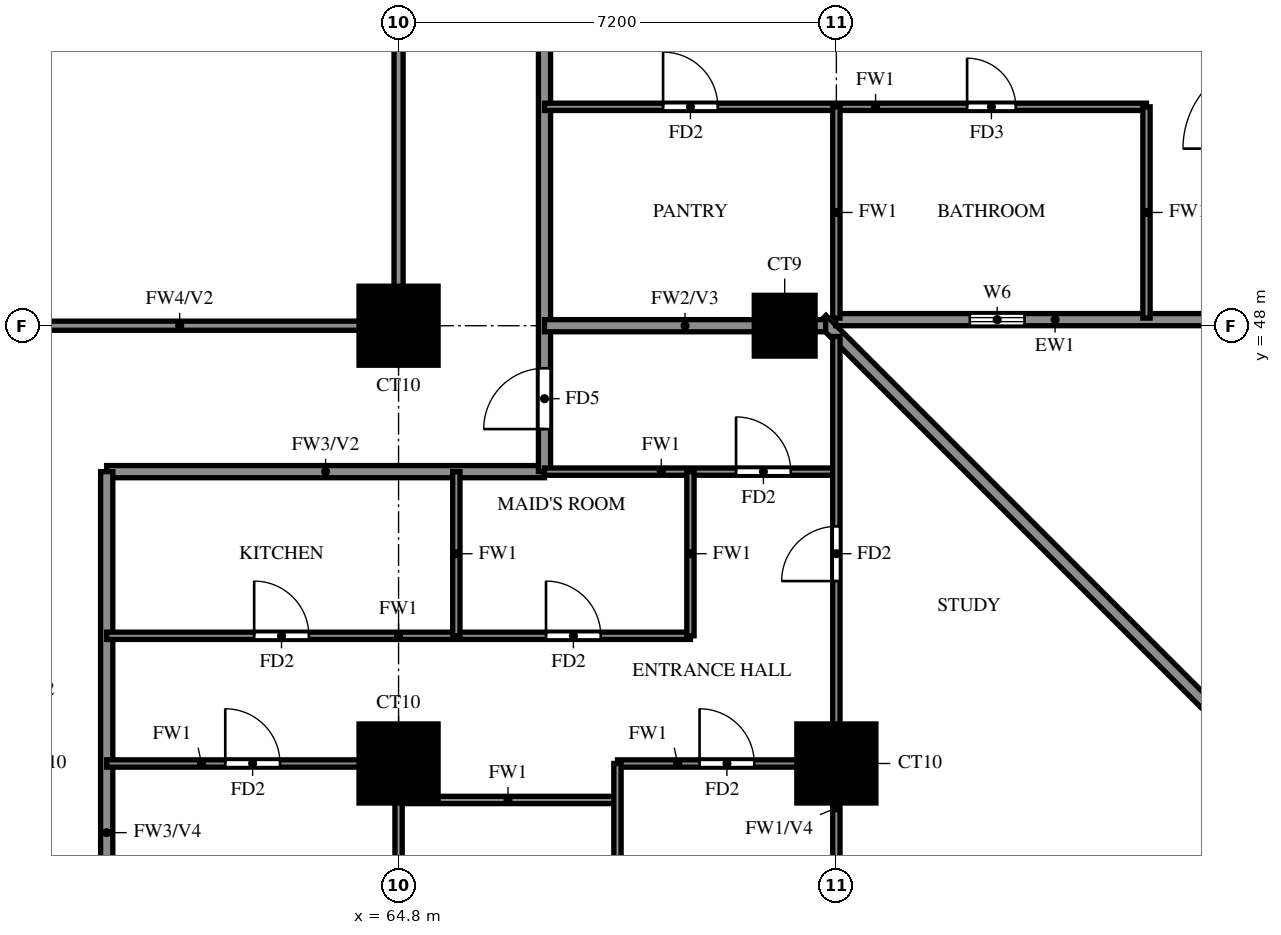
"""IFC4 building model, lengths in metres.
Left out: names, types, materials, properties, quantities, classifications, styles, units other than length and angle.
Written with IfcOpenShell. Run it as: python <this file> out.ifc"""

import sys

from ifc_helpers import new_model, si_unit, direction, frame, frame_2d, origin, origin_2d, place, context, subcontext, project, spatial, rectangle, extrude, source, transform, mapped, element, fill, save


model = new_model("IFC4")
c1 = context("Model", 3, precision=1e-05, world=origin(), true_north=direction((0.0, 1.0)))
c2 = subcontext(c1, "Body", "Model", "MODEL_VIEW")
j1 = project(units=[si_unit("LENGTHUNIT", "METRE"), si_unit("PLANEANGLEUNIT", "RADIAN")], contexts=[c1])
p1 = place(None, origin())
s1 = spatial("IfcSite", under=j1, at=p1, CompositionType="ELEMENT")
p2 = place(p1, origin())
s2 = spatial("IfcBuilding", under=s1, at=p2, CompositionType="ELEMENT")
p3 = place(p2, frame((0.0, 0.0, 79.5)))
s3 = spatial("IfcBuildingStorey", under=s2, at=p3, CompositionType="ELEMENT", Elevation=79.5)
m1 = source(origin(), c2, "Body", "SweptSolid", [
    extrude(rectangle(XDim=1.3, YDim=1.3, at=origin_2d()), origin(), (0.0, 0.0, 1.0), 3.18),
])
for number, where, z_axis, x_axis in (
    (1, (64.8, 40.8, 0.0), (0.0, 0.0, 1.0), (1.0, 0.0, 0.0)),
    (2, (72.0, 40.8, 0.0), (0.0, 0.0, 1.0), (1.0, 0.0, 0.0)),
    (3, (64.8, 48.0, 0.0), (0.0, 0.0, 1.0), (1.0, 0.0, 0.0)),
):
    element("IfcColumn", number, at=place(p3, frame(where, z_axis=z_axis, x_axis=x_axis)), inside=s3, PredefinedType="COLUMN", context=c2, shape_type="MappedRepresentation", body=[
        mapped(m1, transform((0.0, 0.0, 0.0))),
    ])
m2 = source(origin(), c2, "Body", "SweptSolid", [
    extrude(rectangle(XDim=1.0, YDim=1.0, at=origin_2d()), origin(), (0.0, 0.0, 1.0), 3.18),
])
p4 = place(p3, frame((71.15, 48.0, 0.0), z_axis=(0.0, 0.0, 1.0), x_axis=(1.0, 0.0, 0.0)))
e4 = element("IfcColumn", 4, at=p4, inside=s3, PredefinedType="COLUMN", context=c2, shape_type="MappedRepresentation", body=[
    mapped(m2, transform((0.0, 0.0, 0.0))),
])
p5 = place(p3, frame((85.996, 33.863, 0.0), z_axis=(0.0, 0.0, 1.0), x_axis=(-0.707100718496, 0.707112843825, 0.0)))
e5 = element("IfcWall", 5, at=p5, inside=s3, PredefinedType="SOLIDWALL", context=c2, shape_type="SweptSolid", body=[
    extrude(rectangle(XDim=20.135, YDim=0.2, at=frame_2d((10.067, 0.0))), origin(), (0.0, 0.0, 1.0), 3.18),
])
p6 = place(p3, frame((71.989, 48.1, 0.0), z_axis=(0.0, 0.0, 1.0), x_axis=(1.0, 0.0, 0.0)))
e6 = element("IfcWall", 6, at=p6, inside=s3, PredefinedType="SOLIDWALL", context=c2, shape_type="SweptSolid", body=[
    extrude(rectangle(XDim=6.562, YDim=0.2, at=frame_2d((3.281, 0.0))), origin(), (0.0, 0.0, 1.0), 3.18),
])
p7 = place(p6, frame((2.206, 0.0, 1.5)))
e7 = element("IfcOpeningElement", 7, at=p7, cuts=e6, PredefinedType="OPENING", context=c2, shape_type="SweptSolid", body=[
    extrude(rectangle(XDim=0.9, YDim=0.9, at=frame_2d((0.45, 0.45))), frame((0.0, 0.11, 0.0), z_axis=(0.0, -1.0, 0.0), x_axis=(1.0, 0.0, 0.0)), (0.0, 0.0, 1.0), 0.22),
])
p8 = place(p3, frame((60.0, 45.6, 0.0), z_axis=(0.0, 0.0, 1.0), x_axis=(1.0, 0.0, 0.0)))
e8 = element("IfcWall", 8, at=p8, inside=s3, PredefinedType="SOLIDWALL", context=c2, shape_type="SweptSolid", body=[
    extrude(rectangle(XDim=7.2, YDim=0.2, at=frame_2d((3.6, 0.0))), origin(), (0.0, 0.0, 1.0), 3.18),
])
p9 = place(p3, frame((60.0, 33.725, 0.0), z_axis=(0.0, 0.0, 1.0), x_axis=(0.0, 1.0, 0.0)))
e9 = element("IfcWall", 9, at=p9, inside=s3, PredefinedType="SOLIDWALL", context=c2, shape_type="SweptSolid", body=[
    extrude(rectangle(XDim=11.875, YDim=0.2, at=frame_2d((5.938, 0.0))), origin(), (0.0, 0.0, 1.0), 2.28),
])
p10 = place(p3, frame((67.2, 45.6, 0.0), z_axis=(0.0, 0.0, 1.0), x_axis=(0.0, 1.0, 0.0)))
e10 = element("IfcWall", 10, at=p10, inside=s3, PredefinedType="SOLIDWALL", context=c2, shape_type="SweptSolid", body=[
    extrude(rectangle(XDim=14.4, YDim=0.2, at=frame_2d((7.2, 0.0))), origin(), (0.0, 0.0, 1.0), 3.18),
])
p11 = place(p10, frame((0.7, 0.0, 0.0)))
e11 = element("IfcOpeningElement", 11, at=p11, cuts=e10, PredefinedType="OPENING", context=c2, shape_type="SweptSolid", body=[
    extrude(rectangle(XDim=1.0, YDim=2.1, at=frame_2d((0.5, 1.05))), frame((0.0, 0.11, 0.0), z_axis=(0.0, -1.0, 0.0), x_axis=(1.0, 0.0, 0.0)), (0.0, 0.0, 1.0), 0.22),
])
p12 = place(p3, frame((67.2, 48.0, 0.0), z_axis=(0.0, 0.0, 1.0), x_axis=(1.0, 0.0, 0.0)))
e12 = element("IfcWall", 12, at=p12, inside=s3, PredefinedType="SOLIDWALL", context=c2, shape_type="SweptSolid", body=[
    extrude(rectangle(XDim=4.623, YDim=0.2, at=frame_2d((2.312, 0.0))), origin(), (0.0, 0.0, 1.0), 3.18),
])
p13 = place(p3, frame((64.8, 40.2, 0.0), z_axis=(0.0, 0.0, 1.0), x_axis=(1.0, 0.0, 0.0)))
e13 = element("IfcWall", 13, at=p13, inside=s3, PredefinedType="PARTITIONING", context=c2, shape_type="SweptSolid", body=[
    extrude(rectangle(XDim=3.6, YDim=0.12, at=frame_2d((1.8, 0.0))), origin(), (0.0, 0.0, 1.0), 3.18),
])
p14 = place(p3, frame((60.0, 40.8, 0.0), z_axis=(0.0, 0.0, 1.0), x_axis=(1.0, 0.0, 0.0)))
e14 = element("IfcWall", 14, at=p14, inside=s3, PredefinedType="PARTITIONING", context=c2, shape_type="SweptSolid", body=[
    extrude(rectangle(XDim=4.8, YDim=0.12, at=frame_2d((2.4, 0.0))), origin(), (0.0, 0.0, 1.0), 3.18),
])
p15 = place(p14, frame((1.95, 0.0, 0.0)))
e15 = element("IfcOpeningElement", 15, at=p15, cuts=e14, PredefinedType="OPENING", context=c2, shape_type="SweptSolid", body=[
    extrude(rectangle(XDim=0.9, YDim=2.1, at=frame_2d((0.45, 1.05))), frame((0.0, 0.07, 0.0), z_axis=(0.0, -1.0, 0.0), x_axis=(1.0, 0.0, 0.0)), (0.0, 0.0, 1.0), 0.14),
])
p16 = place(p3, frame((68.4, 40.8, 0.0), z_axis=(0.0, 0.0, 1.0), x_axis=(1.0, 0.0, 0.0)))
e16 = element("IfcWall", 16, at=p16, inside=s3, PredefinedType="PARTITIONING", context=c2, shape_type="SweptSolid", body=[
    extrude(rectangle(XDim=3.6, YDim=0.12, at=frame_2d((1.8, 0.0))), origin(), (0.0, 0.0, 1.0), 3.18),
])
p17 = place(p16, frame((1.35, 0.0, 0.0)))
e17 = element("IfcOpeningElement", 17, at=p17, cuts=e16, PredefinedType="OPENING", context=c2, shape_type="SweptSolid", body=[
    extrude(rectangle(XDim=0.9, YDim=2.1, at=frame_2d((0.45, 1.05))), frame((0.0, 0.07, 0.0), z_axis=(0.0, -1.0, 0.0), x_axis=(1.0, 0.0, 0.0)), (0.0, 0.0, 1.0), 0.14),
])
p18 = place(p3, frame((60.0, 42.9, 0.0), z_axis=(0.0, 0.0, 1.0), x_axis=(1.0, 0.0, 0.0)))
e18 = element("IfcWall", 18, at=p18, inside=s3, PredefinedType="PARTITIONING", context=c2, shape_type="SweptSolid", body=[
    extrude(rectangle(XDim=9.6, YDim=0.12, at=frame_2d((4.8, 0.0))), origin(), (0.0, 0.0, 1.0), 3.18),
])
p19 = place(p18, frame((7.225, 0.0, 0.0)))
e19 = element("IfcOpeningElement", 19, at=p19, cuts=e18, PredefinedType="OPENING", context=c2, shape_type="SweptSolid", body=[
    extrude(rectangle(XDim=0.9, YDim=2.1, at=frame_2d((0.45, 1.05))), frame((0.0, 0.07, 0.0), z_axis=(0.0, -1.0, 0.0), x_axis=(1.0, 0.0, 0.0)), (0.0, 0.0, 1.0), 0.14),
])
p20 = place(p18, frame((2.425, 0.0, 0.0)))
e20 = element("IfcOpeningElement", 20, at=p20, cuts=e18, PredefinedType="OPENING", context=c2, shape_type="SweptSolid", body=[
    extrude(rectangle(XDim=0.9, YDim=2.1, at=frame_2d((0.45, 1.05))), frame((0.0, 0.07, 0.0), z_axis=(0.0, -1.0, 0.0), x_axis=(1.0, 0.0, 0.0)), (0.0, 0.0, 1.0), 0.14),
])
p21 = place(p3, frame((67.2, 45.6, 0.0), z_axis=(0.0, 0.0, 1.0), x_axis=(1.0, 0.0, 0.0)))
e21 = element("IfcWall", 21, at=p21, inside=s3, PredefinedType="PARTITIONING", context=c2, shape_type="SweptSolid", body=[
    extrude(rectangle(XDim=4.8, YDim=0.12, at=frame_2d((2.4, 0.0))), origin(), (0.0, 0.0, 1.0), 3.18),
])
p22 = place(p21, frame((3.15, 0.0, 0.0)))
e22 = element("IfcOpeningElement", 22, at=p22, cuts=e21, PredefinedType="OPENING", context=c2, shape_type="SweptSolid", body=[
    extrude(rectangle(XDim=0.9, YDim=2.1, at=frame_2d((0.45, 1.05))), frame((0.0, 0.07, 0.0), z_axis=(0.0, -1.0, 0.0), x_axis=(1.0, 0.0, 0.0)), (0.0, 0.0, 1.0), 0.14),
])
p23 = place(p3, frame((67.2, 51.6, 0.0), z_axis=(0.0, 0.0, 1.0), x_axis=(1.0, 0.0, 0.0)))
e23 = element("IfcWall", 23, at=p23, inside=s3, PredefinedType="PARTITIONING", context=c2, shape_type="SweptSolid", body=[
    extrude(rectangle(XDim=9.9, YDim=0.12, at=frame_2d((4.95, 0.0))), origin(), (0.0, 0.0, 1.0), 3.18),
])
p24 = place(p23, frame((6.95, 0.0, 0.0)))
e24 = element("IfcOpeningElement", 24, at=p24, cuts=e23, PredefinedType="OPENING", context=c2, shape_type="SweptSolid", body=[
    extrude(rectangle(XDim=0.8, YDim=2.1, at=frame_2d((0.4, 1.05))), frame((0.0, 0.07, 0.0), z_axis=(0.0, -1.0, 0.0), x_axis=(1.0, 0.0, 0.0)), (0.0, 0.0, 1.0), 0.14),
])
p25 = place(p23, frame((1.95, 0.0, 0.0)))
e25 = element("IfcOpeningElement", 25, at=p25, cuts=e23, PredefinedType="OPENING", context=c2, shape_type="SweptSolid", body=[
    extrude(rectangle(XDim=0.9, YDim=2.1, at=frame_2d((0.45, 1.05))), frame((0.0, 0.07, 0.0), z_axis=(0.0, -1.0, 0.0), x_axis=(1.0, 0.0, 0.0)), (0.0, 0.0, 1.0), 0.14),
])
p26 = place(p3, frame((64.8, 33.725, 0.0), z_axis=(0.0, 0.0, 1.0), x_axis=(0.0, 1.0, 0.0)))
e26 = element("IfcWall", 26, at=p26, inside=s3, PredefinedType="PARTITIONING", context=c2, shape_type="SweptSolid", body=[
    extrude(rectangle(XDim=7.075, YDim=0.12, at=frame_2d((3.538, 0.0))), origin(), (0.0, 0.0, 1.0), 3.18),
])
p27 = place(p3, frame((65.75, 42.9, 0.0), z_axis=(0.0, 0.0, 1.0), x_axis=(0.0, 1.0, 0.0)))
e27 = element("IfcWall", 27, at=p27, inside=s3, PredefinedType="PARTITIONING", context=c2, shape_type="SweptSolid", body=[
    extrude(rectangle(XDim=2.7, YDim=0.12, at=frame_2d((1.35, 0.0))), origin(), (0.0, 0.0, 1.0), 3.18),
])
p28 = place(p3, frame((68.4, 33.725, 0.0), z_axis=(0.0, 0.0, 1.0), x_axis=(0.0, 1.0, 0.0)))
e28 = element("IfcWall", 28, at=p28, inside=s3, PredefinedType="PARTITIONING", context=c2, shape_type="SweptSolid", body=[
    extrude(rectangle(XDim=7.075, YDim=0.12, at=frame_2d((3.538, 0.0))), origin(), (0.0, 0.0, 1.0), 2.28),
])
p29 = place(p28, frame((2.837, 0.0, 0.0)))
e29 = element("IfcOpeningElement", 29, at=p29, cuts=e28, PredefinedType="OPENING", context=c2, shape_type="SweptSolid", body=[
    extrude(rectangle(XDim=0.8, YDim=2.1, at=frame_2d((0.4, 1.05))), frame((0.0, 0.07, 0.0), z_axis=(0.0, -1.0, 0.0), x_axis=(1.0, 0.0, 0.0)), (0.0, 0.0, 1.0), 0.14),
])
p30 = place(p3, frame((69.6, 42.9, 0.0), z_axis=(0.0, 0.0, 1.0), x_axis=(0.0, 1.0, 0.0)))
e30 = element("IfcWall", 30, at=p30, inside=s3, PredefinedType="PARTITIONING", context=c2, shape_type="SweptSolid", body=[
    extrude(rectangle(XDim=2.7, YDim=0.12, at=frame_2d((1.35, 0.0))), origin(), (0.0, 0.0, 1.0), 3.18),
])
p31 = place(p3, frame((72.0, 33.725, 0.0), z_axis=(0.0, 0.0, 1.0), x_axis=(0.0, 1.0, 0.0)))
e31 = element("IfcWall", 31, at=p31, inside=s3, PredefinedType="PARTITIONING", context=c2, shape_type="SweptSolid", body=[
    extrude(rectangle(XDim=14.098, YDim=0.12, at=frame_2d((7.049, 0.0))), origin(), (0.0, 0.0, 1.0), 2.28),
])
p32 = place(p31, frame((10.075, 0.0, 0.0)))
e32 = element("IfcOpeningElement", 32, at=p32, cuts=e31, PredefinedType="OPENING", context=c2, shape_type="SweptSolid", body=[
    extrude(rectangle(XDim=0.9, YDim=2.1, at=frame_2d((0.45, 1.05))), frame((0.0, 0.07, 0.0), z_axis=(0.0, -1.0, 0.0), x_axis=(1.0, 0.0, 0.0)), (0.0, 0.0, 1.0), 0.14),
])
for number, where, z_axis, x_axis in (
    (33, (72.0, 48.125, 0.0), (0.0, 0.0, 1.0), (0.0, 1.0, 0.0)),
    (34, (77.1, 48.125, 0.0), (0.0, 0.0, 1.0), (0.0, 1.0, 0.0)),
):
    element("IfcWall", number, at=place(p3, frame(where, z_axis=z_axis, x_axis=x_axis)), inside=s3, PredefinedType="PARTITIONING", context=c2, shape_type="SweptSolid", body=[
        extrude(rectangle(XDim=3.475, YDim=0.12, at=frame_2d((1.738, 0.0))), origin(), (0.0, 0.0, 1.0), 3.18),
    ])
p33 = place(p3, frame((57.6, 48.0, 0.0), z_axis=(0.0, 0.0, 1.0), x_axis=(1.0, 0.0, 0.0)))
e35 = element("IfcWall", 35, at=p33, inside=s3, PredefinedType="SOLIDWALL", context=c2, shape_type="SweptSolid", body=[
    extrude(rectangle(XDim=7.2, YDim=0.15, at=frame_2d((3.6, 0.0))), origin(), (0.0, 0.0, 1.0), 2.28),
])
p34 = place(p3, frame((64.8, 48.0, 0.0), z_axis=(0.0, 0.0, 1.0), x_axis=(0.0, 1.0, 0.0)))
e36 = element("IfcWall", 36, at=p34, inside=s3, PredefinedType="SOLIDWALL", context=c2, shape_type="SweptSolid", body=[
    extrude(rectangle(XDim=14.4, YDim=0.15, at=frame_2d((7.2, 0.0))), origin(), (0.0, 0.0, 1.0), 2.28),
])
p35 = place(p7, origin())
e37 = element("IfcWindow", 37, at=p35, inside=s3, PartitioningType="SINGLE_PANEL", PredefinedType="WINDOW", context=c2, shape_type="SweptSolid", body=[
    extrude(rectangle(XDim=0.9, YDim=0.9, at=frame_2d((0.45, 0.45))), frame((0.0, 0.03, 0.0), z_axis=(0.0, -1.0, 0.0), x_axis=(1.0, 0.0, 0.0)), (0.0, 0.0, 1.0), 0.06),
])
fill(e7, e37)
p36 = place(p24, origin())
e38 = element("IfcDoor", 38, at=p36, inside=s3, OperationType="SINGLE_SWING_LEFT", PredefinedType="DOOR", context=c2, shape_type="SweptSolid", body=[
    extrude(rectangle(XDim=0.8, YDim=2.1, at=frame_2d((0.4, 1.05))), frame((0.0, 0.025, 0.0), z_axis=(0.0, -1.0, 0.0), x_axis=(1.0, 0.0, 0.0)), (0.0, 0.0, 1.0), 0.05),
])
fill(e24, e38)
p37 = place(p25, origin())
e39 = element("IfcDoor", 39, at=p37, inside=s3, OperationType="SINGLE_SWING_LEFT", PredefinedType="DOOR", context=c2, shape_type="SweptSolid", body=[
    extrude(rectangle(XDim=0.9, YDim=2.1, at=frame_2d((0.45, 1.05))), frame((0.0, 0.025, 0.0), z_axis=(0.0, -1.0, 0.0), x_axis=(1.0, 0.0, 0.0)), (0.0, 0.0, 1.0), 0.05),
])
fill(e25, e39)
p38 = place(p22, origin())
e40 = element("IfcDoor", 40, at=p38, inside=s3, OperationType="SINGLE_SWING_LEFT", PredefinedType="DOOR", context=c2, shape_type="SweptSolid", body=[
    extrude(rectangle(XDim=0.9, YDim=2.1, at=frame_2d((0.45, 1.05))), frame((0.0, 0.025, 0.0), z_axis=(0.0, -1.0, 0.0), x_axis=(1.0, 0.0, 0.0)), (0.0, 0.0, 1.0), 0.05),
])
fill(e22, e40)
p39 = place(p11, origin())
e41 = element("IfcDoor", 41, at=p39, inside=s3, OperationType="SINGLE_SWING_RIGHT", PredefinedType="DOOR", context=c2, shape_type="SweptSolid", body=[
    extrude(rectangle(XDim=1.0, YDim=2.1, at=frame_2d((0.5, 1.05))), frame((0.0, 0.025, 0.0), z_axis=(0.0, -1.0, 0.0), x_axis=(1.0, 0.0, 0.0)), (0.0, 0.0, 1.0), 0.05),
])
fill(e11, e41)
p40 = place(p17, origin())
e42 = element("IfcDoor", 42, at=p40, inside=s3, OperationType="SINGLE_SWING_LEFT", PredefinedType="DOOR", context=c2, shape_type="SweptSolid", body=[
    extrude(rectangle(XDim=0.9, YDim=2.1, at=frame_2d((0.45, 1.05))), frame((0.0, 0.025, 0.0), z_axis=(0.0, -1.0, 0.0), x_axis=(1.0, 0.0, 0.0)), (0.0, 0.0, 1.0), 0.05),
])
fill(e17, e42)
p41 = place(p15, origin())
e43 = element("IfcDoor", 43, at=p41, inside=s3, OperationType="SINGLE_SWING_RIGHT", PredefinedType="DOOR", context=c2, shape_type="SweptSolid", body=[
    extrude(rectangle(XDim=0.9, YDim=2.1, at=frame_2d((0.45, 1.05))), frame((0.0, 0.025, 0.0), z_axis=(0.0, -1.0, 0.0), x_axis=(1.0, 0.0, 0.0)), (0.0, 0.0, 1.0), 0.05),
])
fill(e15, e43)
p42 = place(p19, origin())
e44 = element("IfcDoor", 44, at=p42, inside=s3, OperationType="SINGLE_SWING_LEFT", PredefinedType="DOOR", context=c2, shape_type="SweptSolid", body=[
    extrude(rectangle(XDim=0.9, YDim=2.1, at=frame_2d((0.45, 1.05))), frame((0.0, 0.025, 0.0), z_axis=(0.0, -1.0, 0.0), x_axis=(1.0, 0.0, 0.0)), (0.0, 0.0, 1.0), 0.05),
])
fill(e19, e44)
p43 = place(p20, origin())
e45 = element("IfcDoor", 45, at=p43, inside=s3, OperationType="SINGLE_SWING_LEFT", PredefinedType="DOOR", context=c2, shape_type="SweptSolid", body=[
    extrude(rectangle(XDim=0.9, YDim=2.1, at=frame_2d((0.45, 1.05))), frame((0.0, 0.025, 0.0), z_axis=(0.0, -1.0, 0.0), x_axis=(1.0, 0.0, 0.0)), (0.0, 0.0, 1.0), 0.05),
])
fill(e20, e45)
p44 = place(p32, origin())
e46 = element("IfcDoor", 46, at=p44, inside=s3, OperationType="SINGLE_SWING_RIGHT", PredefinedType="DOOR", context=c2, shape_type="SweptSolid", body=[
    extrude(rectangle(XDim=0.9, YDim=2.1, at=frame_2d((0.45, 1.05))), frame((0.0, 0.025, 0.0), z_axis=(0.0, -1.0, 0.0), x_axis=(1.0, 0.0, 0.0)), (0.0, 0.0, 1.0), 0.05),
])
fill(e32, e46)
save(model, sys.argv[1])
